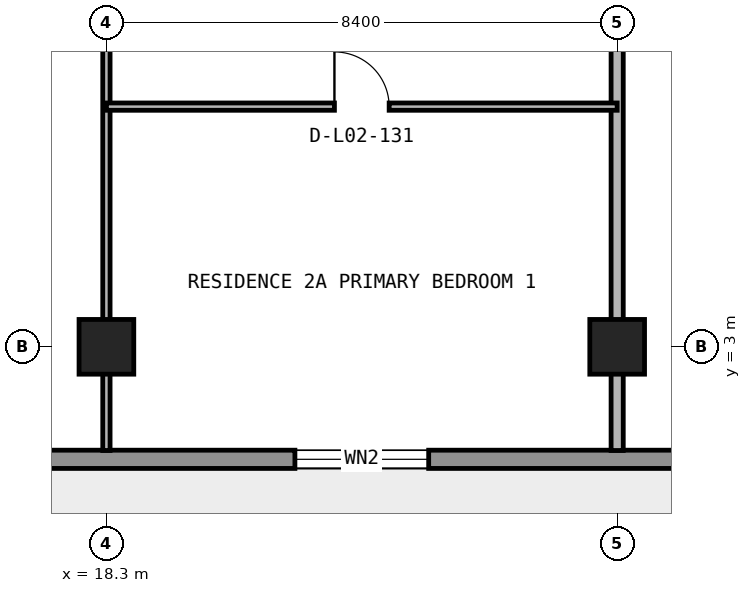
"""IFC4 building model, lengths in metres.
Left out: names, types, materials, properties, quantities, classifications, styles, units other than length and angle.
Written with IfcOpenShell. Run it as: python <this file> out.ifc"""

import sys

from ifc_helpers import new_model, si_unit, direction, frame, frame_2d, origin, origin_2d, place, context, subcontext, project, spatial, rectangle, circle, extrude, element, fill, save


model = new_model("IFC4")
c1 = context("Model", 3, precision=1e-05, world=origin(), true_north=direction((0.0, 1.0)))
c2 = subcontext(c1, "Body", "Model", "MODEL_VIEW")
j1 = project(units=[si_unit("LENGTHUNIT", "METRE"), si_unit("PLANEANGLEUNIT", "RADIAN")], contexts=[c1])
p1 = place(None, origin())
s1 = spatial("IfcSite", under=j1, at=p1, CompositionType="ELEMENT")
p2 = place(p1, origin())
s2 = spatial("IfcBuilding", under=s1, at=p2, CompositionType="ELEMENT")
p3 = place(p2, frame((0.0, 0.0, 10.2)))
s3 = spatial("IfcBuildingStorey", under=s2, at=p3, CompositionType="ELEMENT", Elevation=10.2)
for number, where, z_axis, x_axis in (
    (1, (18.3, 3.0, 0.0), (0.0, 0.0, 1.0), (1.0, 0.0, 0.0)),
    (2, (26.7, 3.0, 0.0), (0.0, 0.0, 1.0), (1.0, 0.0, 0.0)),
):
    element("IfcColumn", number, at=place(p3, frame(where, z_axis=z_axis, x_axis=x_axis)), inside=s3, PredefinedType="COLUMN", context=c2, shape_type="SweptSolid", body=[
        extrude(circle(Radius=0.45, at=origin_2d()), origin(), (0.0, 0.0, 1.0), 4.5),
    ])
p4 = place(p3, frame((77.2, 1.15, 0.0), z_axis=(0.0, 0.0, 1.0), x_axis=(-1.0, 0.0, 0.0)))
e3 = element("IfcWall", 3, at=p4, inside=s3, PredefinedType="STANDARD", context=c2, shape_type="SweptSolid", body=[
    extrude(rectangle(XDim=76.6, YDim=0.3, at=frame_2d((38.3, 0.0))), origin(), (0.0, 0.0, 1.0), 4.5),
])
p5 = place(p4, frame((70.375, 0.0, 0.85)))
e4 = element("IfcOpeningElement", 4, at=p5, cuts=e3, PredefinedType="OPENING", context=c2, shape_type="SweptSolid", body=[
    extrude(rectangle(XDim=3.0, YDim=2.4, at=frame_2d((1.5, 1.2))), frame((0.0, 0.16, 0.0), z_axis=(0.0, -1.0, 0.0), x_axis=(1.0, 0.0, 0.0)), (0.0, 0.0, 1.0), 0.32),
])
p6 = place(p4, frame((62.2, 0.0, 0.0)))
e5 = element("IfcOpeningElement", 5, at=p6, cuts=e3, PredefinedType="OPENING", context=c2, shape_type="SweptSolid", body=[
    extrude(rectangle(XDim=1.8, YDim=2.3, at=frame_2d((0.9, 1.15))), frame((0.0, 0.16, 0.0), z_axis=(0.0, -1.0, 0.0), x_axis=(1.0, 0.0, 0.0)), (0.0, 0.0, 1.0), 0.32),
])
p7 = place(p4, frame((53.6, 0.0, 0.85)))
e6 = element("IfcOpeningElement", 6, at=p7, cuts=e3, PredefinedType="OPENING", context=c2, shape_type="SweptSolid", body=[
    extrude(rectangle(XDim=2.2, YDim=1.55, at=frame_2d((1.1, 0.775))), frame((0.0, 0.16, 0.0), z_axis=(0.0, -1.0, 0.0), x_axis=(1.0, 0.0, 0.0)), (0.0, 0.0, 1.0), 0.32),
])
p8 = place(p4, frame((37.4, 0.0, 0.0)))
e7 = element("IfcOpeningElement", 7, at=p8, cuts=e3, PredefinedType="OPENING", context=c2, shape_type="SweptSolid", body=[
    extrude(rectangle(XDim=1.8, YDim=2.3, at=frame_2d((0.9, 1.15))), frame((0.0, 0.16, 0.0), z_axis=(0.0, -1.0, 0.0), x_axis=(1.0, 0.0, 0.0)), (0.0, 0.0, 1.0), 0.32),
])
p9 = place(p4, frame((21.0, 0.0, 0.0)))
e8 = element("IfcOpeningElement", 8, at=p9, cuts=e3, PredefinedType="OPENING", context=c2, shape_type="SweptSolid", body=[
    extrude(rectangle(XDim=1.8, YDim=2.3, at=frame_2d((0.9, 1.15))), frame((0.0, 0.16, 0.0), z_axis=(0.0, -1.0, 0.0), x_axis=(1.0, 0.0, 0.0)), (0.0, 0.0, 1.0), 0.32),
])
p10 = place(p4, frame((12.4, 0.0, 0.85)))
e9 = element("IfcOpeningElement", 9, at=p10, cuts=e3, PredefinedType="OPENING", context=c2, shape_type="SweptSolid", body=[
    extrude(rectangle(XDim=2.2, YDim=1.55, at=frame_2d((1.1, 0.775))), frame((0.0, 0.16, 0.0), z_axis=(0.0, -1.0, 0.0), x_axis=(1.0, 0.0, 0.0)), (0.0, 0.0, 1.0), 0.32),
])
p11 = place(p4, frame((3.825, 0.0, 0.0)))
e10 = element("IfcOpeningElement", 10, at=p11, cuts=e3, PredefinedType="OPENING", context=c2, shape_type="SweptSolid", body=[
    extrude(rectangle(XDim=1.8, YDim=2.3, at=frame_2d((0.9, 1.15))), frame((0.0, 0.16, 0.0), z_axis=(0.0, -1.0, 0.0), x_axis=(1.0, 0.0, 0.0)), (0.0, 0.0, 1.0), 0.32),
])
p12 = place(p3, frame((18.3, 1.295, 0.0), z_axis=(0.0, 0.0, 1.0), x_axis=(0.0, 1.0, 0.0)))
e11 = element("IfcWall", 11, at=p12, inside=s3, PredefinedType="PARTITIONING", context=c2, shape_type="SweptSolid", body=[
    extrude(rectangle(XDim=32.605, YDim=0.12, at=frame_2d((16.302, 0.0))), origin(), (0.0, 0.0, 1.0), 4.5),
])
p13 = place(p12, frame((24.655, 0.0, 0.0)))
e12 = element("IfcOpeningElement", 12, at=p13, cuts=e11, PredefinedType="OPENING", context=c2, shape_type="SweptSolid", body=[
    extrude(rectangle(XDim=0.9, YDim=2.15, at=frame_2d((0.45, 1.075))), frame((0.0, 0.07, 0.0), z_axis=(0.0, -1.0, 0.0), x_axis=(1.0, 0.0, 0.0)), (0.0, 0.0, 1.0), 0.14),
])
p14 = place(p3, frame((26.7, 1.295, 0.0), z_axis=(0.0, 0.0, 1.0), x_axis=(0.0, 1.0, 0.0)))
e13 = element("IfcWall", 13, at=p14, inside=s3, PredefinedType="PARTITIONING", context=c2, shape_type="SweptSolid", body=[
    extrude(rectangle(XDim=32.605, YDim=0.2, at=frame_2d((16.302, 0.0))), origin(), (0.0, 0.0, 1.0), 3.464),
])
p15 = place(p3, frame((18.3, 6.95, 0.0), z_axis=(0.0, 0.0, 1.0), x_axis=(1.0, 0.0, 0.0)))
e14 = element("IfcWall", 14, at=p15, inside=s3, PredefinedType="PARTITIONING", context=c2, shape_type="SweptSolid", body=[
    extrude(rectangle(XDim=8.4, YDim=0.12, at=frame_2d((4.2, 0.0))), origin(), (0.0, 0.0, 1.0), 4.5),
])
p16 = place(p15, frame((3.75, 0.0, 0.0)))
e15 = element("IfcOpeningElement", 15, at=p16, cuts=e14, PredefinedType="OPENING", context=c2, shape_type="SweptSolid", body=[
    extrude(rectangle(XDim=0.9, YDim=2.15, at=frame_2d((0.45, 1.075))), frame((0.0, 0.07, 0.0), z_axis=(0.0, -1.0, 0.0), x_axis=(1.0, 0.0, 0.0)), (0.0, 0.0, 1.0), 0.14),
])
p17 = place(p7, origin())
e16 = element("IfcWindow", 16, at=p17, inside=s3, PartitioningType="SINGLE_PANEL", PredefinedType="WINDOW", context=c2, shape_type="SweptSolid", body=[
    extrude(rectangle(XDim=2.2, YDim=1.55, at=frame_2d((1.1, 0.775))), frame((0.0, 0.03, 0.0), z_axis=(0.0, -1.0, 0.0), x_axis=(1.0, 0.0, 0.0)), (0.0, 0.0, 1.0), 0.06),
])
fill(e6, e16)
p18 = place(p16, origin())
e17 = element("IfcDoor", 17, at=p18, inside=s3, OperationType="SINGLE_SWING_LEFT", PredefinedType="DOOR", context=c2, shape_type="SweptSolid", body=[
    extrude(rectangle(XDim=0.9, YDim=2.15, at=frame_2d((0.45, 1.075))), frame((0.0, 0.025, 0.0), z_axis=(0.0, -1.0, 0.0), x_axis=(1.0, 0.0, 0.0)), (0.0, 0.0, 1.0), 0.05),
])
fill(e15, e17)
save(model, sys.argv[1])
